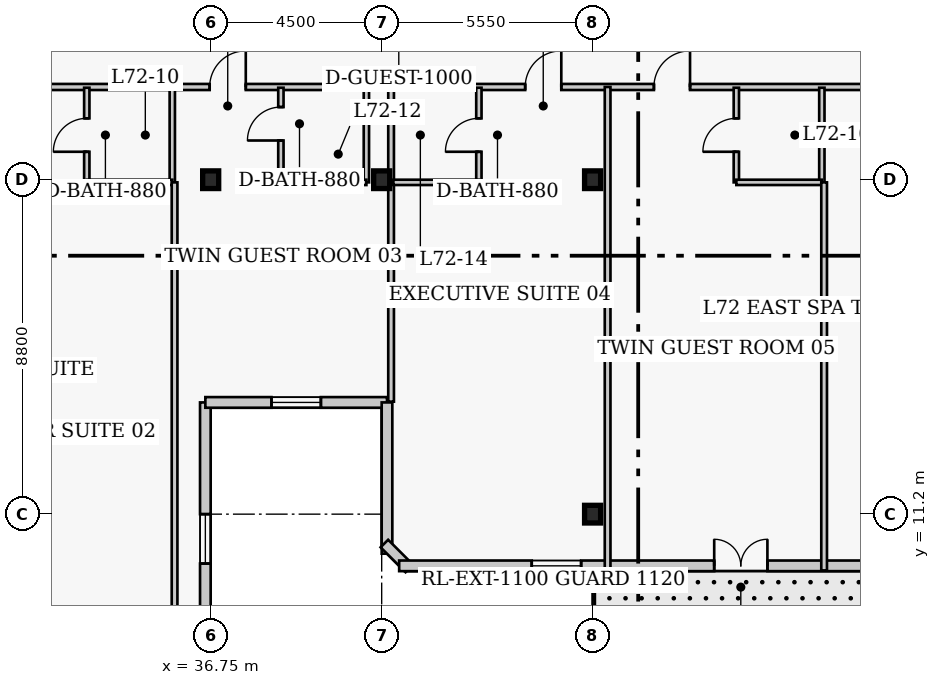
"""IFC4 building model, lengths in metres.
Left out: names, types, materials, properties, quantities, classifications, styles, units other than length and angle.
Written with IfcOpenShell. Run it as: python <this file> out.ifc"""

import sys

from ifc_helpers import new_model, si_unit, direction, frame, frame_2d, origin, origin_2d, place, context, subcontext, project, spatial, rectangle, i_section, extrude, element, fill, save


model = new_model("IFC4")
c1 = context("Model", 3, precision=1e-05, world=origin(), true_north=direction((0.0, 1.0)))
c2 = subcontext(c1, "Body", "Model", "MODEL_VIEW")
j1 = project(units=[si_unit("LENGTHUNIT", "METRE"), si_unit("PLANEANGLEUNIT", "RADIAN")], contexts=[c1])
p1 = place(None, origin())
s1 = spatial("IfcSite", under=j1, at=p1, CompositionType="ELEMENT")
p2 = place(p1, origin())
s2 = spatial("IfcBuilding", under=s1, at=p2, CompositionType="ELEMENT")
p3 = place(p2, frame((0.0, 0.0, 289.4)))
s3 = spatial("IfcBuildingStorey", under=s2, at=p3, CompositionType="ELEMENT", Elevation=289.4)
for number, where, z_axis, x_axis in (
    (1, (36.75, 20.0, 0.0), (0.0, 0.0, 1.0), (1.0, 0.0, 0.0)),
    (2, (41.25, 20.0, 0.0), (0.0, 0.0, 1.0), (1.0, 0.0, 0.0)),
    (3, (46.8, 11.2, 0.0), (0.0, 0.0, 1.0), (1.0, 0.0, 0.0)),
    (4, (46.8, 20.0, 0.0), (0.0, 0.0, 1.0), (1.0, 0.0, 0.0)),
):
    element("IfcColumn", number, at=place(p3, frame(where, z_axis=z_axis, x_axis=x_axis)), inside=s3, PredefinedType="COLUMN", context=c2, shape_type="SweptSolid", body=[
        extrude(i_section(OverallWidth=0.422, OverallDepth=0.465, WebThickness=0.045, FlangeThickness=0.073, FilletRadius=0.017, at=origin_2d()), origin(), (0.0, 0.0, 1.0), 4.0),
    ])
p4 = place(p3, frame((36.61, 6.96, 0.0), z_axis=(0.0, 0.0, 1.0), x_axis=(0.0, 1.0, 0.0)))
e5 = element("IfcWall", 5, at=p4, inside=s3, PredefinedType="SOLIDWALL", context=c2, shape_type="SweptSolid", body=[
    extrude(rectangle(XDim=7.18, YDim=0.28, at=frame_2d((3.59, 0.0))), origin(), (0.0, 0.0, 1.0), 3.76),
])
p5 = place(p4, frame((2.94, 0.0, 0.85)))
e6 = element("IfcOpeningElement", 6, at=p5, cuts=e5, PredefinedType="OPENING", context=c2, shape_type="SweptSolid", body=[
    extrude(rectangle(XDim=1.3, YDim=1.7, at=frame_2d((0.65, 0.85))), frame((0.0, 0.15, 0.0), z_axis=(0.0, -1.0, 0.0), x_axis=(1.0, 0.0, 0.0)), (0.0, 0.0, 1.0), 0.3),
])
p6 = place(p3, frame((36.61, 14.14, 0.0), z_axis=(0.0, 0.0, 1.0), x_axis=(1.0, 0.0, 0.0)))
e7 = element("IfcWall", 7, at=p6, inside=s3, PredefinedType="SOLIDWALL", context=c2, shape_type="SweptSolid", body=[
    extrude(rectangle(XDim=4.78, YDim=0.28, at=frame_2d((2.39, 0.0))), origin(), (0.0, 0.0, 1.0), 3.76),
])
p7 = place(p6, frame((1.74, 0.0, 0.85)))
e8 = element("IfcOpeningElement", 8, at=p7, cuts=e7, PredefinedType="OPENING", context=c2, shape_type="SweptSolid", body=[
    extrude(rectangle(XDim=1.3, YDim=1.7, at=frame_2d((0.65, 0.85))), frame((0.0, 0.15, 0.0), z_axis=(0.0, -1.0, 0.0), x_axis=(1.0, 0.0, 0.0)), (0.0, 0.0, 1.0), 0.3),
])
p8 = place(p3, frame((41.39, 14.14, 0.0), z_axis=(0.0, 0.0, 1.0), x_axis=(0.0, -1.0, 0.0)))
e9 = element("IfcWall", 9, at=p8, inside=s3, PredefinedType="SOLIDWALL", context=c2, shape_type="SweptSolid", body=[
    extrude(rectangle(XDim=3.98, YDim=0.28, at=frame_2d((1.99, 0.0))), origin(), (0.0, 0.0, 1.0), 3.76),
])
p9 = place(p3, frame((41.321, 10.427, 0.0), z_axis=(0.0, 0.0, 1.0), x_axis=(0.707106781187, -0.707106781187, 0.0)))
e10 = element("IfcWall", 10, at=p9, inside=s3, PredefinedType="SOLIDWALL", context=c2, shape_type="SweptSolid", body=[
    extrude(rectangle(XDim=0.928, YDim=0.28, at=frame_2d((0.464, 0.0))), origin(), (0.0, 0.0, 1.0), 3.76),
])
p10 = place(p3, frame((41.71, 9.84, 0.0), z_axis=(0.0, 0.0, 1.0), x_axis=(1.0, 0.0, 0.0)))
e11 = element("IfcWall", 11, at=p10, inside=s3, PredefinedType="SOLIDWALL", context=c2, shape_type="SweptSolid", body=[
    extrude(rectangle(XDim=24.83, YDim=0.28, at=frame_2d((12.415, 0.0))), origin(), (0.0, 0.0, 1.0), 3.76),
])
p11 = place(p10, frame((8.29, 0.0, 0.0)))
e12 = element("IfcOpeningElement", 12, at=p11, cuts=e11, PredefinedType="OPENING", context=c2, shape_type="SweptSolid", body=[
    extrude(rectangle(XDim=1.4, YDim=2.15, at=frame_2d((0.7, 1.075))), frame((0.0, 0.15, 0.0), z_axis=(0.0, -1.0, 0.0), x_axis=(1.0, 0.0, 0.0)), (0.0, 0.0, 1.0), 0.3),
])
p12 = place(p10, frame((3.488, 0.0, 0.85)))
e13 = element("IfcOpeningElement", 13, at=p12, cuts=e11, PredefinedType="OPENING", context=c2, shape_type="SweptSolid", body=[
    extrude(rectangle(XDim=1.3, YDim=1.7, at=frame_2d((0.65, 0.85))), frame((0.0, 0.15, 0.0), z_axis=(0.0, -1.0, 0.0), x_axis=(1.0, 0.0, 0.0)), (0.0, 0.0, 1.0), 0.3),
])
p13 = place(p10, frame((18.892, 0.0, 0.85)))
e14 = element("IfcOpeningElement", 14, at=p13, cuts=e11, PredefinedType="OPENING", context=c2, shape_type="SweptSolid", body=[
    extrude(rectangle(XDim=1.3, YDim=1.7, at=frame_2d((0.65, 0.85))), frame((0.0, 0.15, 0.0), z_axis=(0.0, -1.0, 0.0), x_axis=(1.0, 0.0, 0.0)), (0.0, 0.0, 1.0), 0.3),
])
p14 = place(p10, frame((13.391, 0.0, 0.85)))
e15 = element("IfcOpeningElement", 15, at=p14, cuts=e11, PredefinedType="OPENING", context=c2, shape_type="SweptSolid", body=[
    extrude(rectangle(XDim=1.3, YDim=1.7, at=frame_2d((0.65, 0.85))), frame((0.0, 0.15, 0.0), z_axis=(0.0, -1.0, 0.0), x_axis=(1.0, 0.0, 0.0)), (0.0, 0.0, 1.0), 0.3),
])
p15 = place(p3, frame((19.9, 22.44, 0.0), z_axis=(0.0, 0.0, 1.0), x_axis=(1.0, 0.0, 0.0)))
e16 = element("IfcWall", 16, at=p15, inside=s3, PredefinedType="PARTITIONING", context=c2, shape_type="SweptSolid", body=[
    extrude(rectangle(XDim=15.9, YDim=0.16, at=frame_2d((7.95, 0.0))), origin(), (0.0, 0.0, 1.0), 3.76),
])
p16 = place(p15, frame((3.265, 0.0, 0.0)))
e17 = element("IfcOpeningElement", 17, at=p16, cuts=e16, PredefinedType="OPENING", context=c2, shape_type="SweptSolid", body=[
    extrude(rectangle(XDim=0.95, YDim=2.1, at=frame_2d((0.475, 1.05))), frame((0.0, 0.09, 0.0), z_axis=(0.0, -1.0, 0.0), x_axis=(1.0, 0.0, 0.0)), (0.0, 0.0, 1.0), 0.18),
])
p17 = place(p15, frame((7.135, 0.0, 0.0)))
e18 = element("IfcOpeningElement", 18, at=p17, cuts=e16, PredefinedType="OPENING", context=c2, shape_type="SweptSolid", body=[
    extrude(rectangle(XDim=1.0, YDim=2.15, at=frame_2d((0.5, 1.075))), frame((0.0, 0.09, 0.0), z_axis=(0.0, -1.0, 0.0), x_axis=(1.0, 0.0, 0.0)), (0.0, 0.0, 1.0), 0.18),
])
p18 = place(p15, frame((11.4, 0.0, 0.0)))
e19 = element("IfcOpeningElement", 19, at=p18, cuts=e16, PredefinedType="OPENING", context=c2, shape_type="SweptSolid", body=[
    extrude(rectangle(XDim=0.95, YDim=2.1, at=frame_2d((0.475, 1.05))), frame((0.0, 0.09, 0.0), z_axis=(0.0, -1.0, 0.0), x_axis=(1.0, 0.0, 0.0)), (0.0, 0.0, 1.0), 0.18),
])
p19 = place(p3, frame((35.8, 22.44, 0.0), z_axis=(0.0, 0.0, 1.0), x_axis=(1.0, 0.0, 0.0)))
e20 = element("IfcWall", 20, at=p19, inside=s3, PredefinedType="PARTITIONING", context=c2, shape_type="SweptSolid", body=[
    extrude(rectangle(XDim=25.01, YDim=0.16, at=frame_2d((12.505, 0.0))), origin(), (0.0, 0.0, 1.0), 3.76),
])
p20 = place(p19, frame((0.924, 0.0, 0.0)))
e21 = element("IfcOpeningElement", 21, at=p20, cuts=e20, PredefinedType="OPENING", context=c2, shape_type="SweptSolid", body=[
    extrude(rectangle(XDim=0.95, YDim=2.1, at=frame_2d((0.475, 1.05))), frame((0.0, 0.09, 0.0), z_axis=(0.0, -1.0, 0.0), x_axis=(1.0, 0.0, 0.0)), (0.0, 0.0, 1.0), 0.18),
])
p21 = place(p19, frame((9.226, 0.0, 0.0)))
e22 = element("IfcOpeningElement", 22, at=p21, cuts=e20, PredefinedType="OPENING", context=c2, shape_type="SweptSolid", body=[
    extrude(rectangle(XDim=0.95, YDim=2.1, at=frame_2d((0.475, 1.05))), frame((0.0, 0.09, 0.0), z_axis=(0.0, -1.0, 0.0), x_axis=(1.0, 0.0, 0.0)), (0.0, 0.0, 1.0), 0.18),
])
p22 = place(p19, frame((12.614, 0.0, 0.0)))
e23 = element("IfcOpeningElement", 23, at=p22, cuts=e20, PredefinedType="OPENING", context=c2, shape_type="SweptSolid", body=[
    extrude(rectangle(XDim=0.95, YDim=2.1, at=frame_2d((0.475, 1.05))), frame((0.0, 0.09, 0.0), z_axis=(0.0, -1.0, 0.0), x_axis=(1.0, 0.0, 0.0)), (0.0, 0.0, 1.0), 0.18),
])
p23 = place(p19, frame((19.441, 0.0, 0.0)))
e24 = element("IfcOpeningElement", 24, at=p23, cuts=e20, PredefinedType="OPENING", context=c2, shape_type="SweptSolid", body=[
    extrude(rectangle(XDim=1.0, YDim=2.15, at=frame_2d((0.5, 1.075))), frame((0.0, 0.09, 0.0), z_axis=(0.0, -1.0, 0.0), x_axis=(1.0, 0.0, 0.0)), (0.0, 0.0, 1.0), 0.18),
])
p24 = place(p19, frame((23.465, 0.0, 0.0)))
e25 = element("IfcOpeningElement", 25, at=p24, cuts=e20, PredefinedType="OPENING", context=c2, shape_type="SweptSolid", body=[
    extrude(rectangle(XDim=0.95, YDim=2.1, at=frame_2d((0.475, 1.05))), frame((0.0, 0.09, 0.0), z_axis=(0.0, -1.0, 0.0), x_axis=(1.0, 0.0, 0.0)), (0.0, 0.0, 1.0), 0.18),
])
p25 = place(p3, frame((33.49, 19.93, 0.0), z_axis=(0.0, 0.0, 1.0), x_axis=(0.0, 1.0, 0.0)))
e26 = element("IfcWall", 26, at=p25, inside=s3, PredefinedType="PLUMBINGWALL", context=c2, shape_type="SweptSolid", body=[
    extrude(rectangle(XDim=2.49, YDim=0.14, at=frame_2d((1.245, 0.0))), origin(), (0.0, 0.0, 1.0), 3.76),
])
p26 = place(p25, frame((0.805, 0.0, 0.0)))
e27 = element("IfcOpeningElement", 27, at=p26, cuts=e26, PredefinedType="OPENING", context=c2, shape_type="SweptSolid", body=[
    extrude(rectangle(XDim=0.88, YDim=2.05, at=frame_2d((0.44, 1.025))), frame((0.0, 0.08, 0.0), z_axis=(0.0, -1.0, 0.0), x_axis=(1.0, 0.0, 0.0)), (0.0, 0.0, 1.0), 0.16),
])
p27 = place(p3, frame((35.74, 19.93, 0.0), z_axis=(0.0, 0.0, 1.0), x_axis=(0.0, 1.0, 0.0)))
e28 = element("IfcWall", 28, at=p27, inside=s3, PredefinedType="PLUMBINGWALL", context=c2, shape_type="SweptSolid", body=[
    extrude(rectangle(XDim=2.49, YDim=0.14, at=frame_2d((1.245, 0.0))), origin(), (0.0, 0.0, 1.0), 3.76),
])
p28 = place(p3, frame((33.49, 19.93, 0.0), z_axis=(0.0, 0.0, 1.0), x_axis=(1.0, 0.0, 0.0)))
e29 = element("IfcWall", 29, at=p28, inside=s3, PredefinedType="PLUMBINGWALL", context=c2, shape_type="SweptSolid", body=[
    extrude(rectangle(XDim=2.25, YDim=0.14, at=frame_2d((1.125, 0.0))), origin(), (0.0, 0.0, 1.0), 3.064),
])
p29 = place(p3, frame((35.8, 6.52, 0.0), z_axis=(0.0, 0.0, 1.0), x_axis=(0.0, 1.0, 0.0)))
e30 = element("IfcWall", 30, at=p29, inside=s3, PredefinedType="PARTITIONING", context=c2, shape_type="SweptSolid", body=[
    extrude(rectangle(XDim=13.41, YDim=0.15, at=frame_2d((6.705, 0.0))), origin(), (0.0, 0.0, 1.0), 3.76),
])
p30 = place(p3, frame((38.597, 19.93, 0.0), z_axis=(0.0, 0.0, 1.0), x_axis=(0.0, 1.0, 0.0)))
e31 = element("IfcWall", 31, at=p30, inside=s3, PredefinedType="PLUMBINGWALL", context=c2, shape_type="SweptSolid", body=[
    extrude(rectangle(XDim=2.49, YDim=0.14, at=frame_2d((1.245, 0.0))), origin(), (0.0, 0.0, 1.0), 3.76),
])
p31 = place(p30, frame((1.102, 0.0, 0.0)))
e32 = element("IfcOpeningElement", 32, at=p31, cuts=e31, PredefinedType="OPENING", context=c2, shape_type="SweptSolid", body=[
    extrude(rectangle(XDim=0.88, YDim=2.05, at=frame_2d((0.44, 1.025))), frame((0.0, 0.08, 0.0), z_axis=(0.0, -1.0, 0.0), x_axis=(1.0, 0.0, 0.0)), (0.0, 0.0, 1.0), 0.16),
])
p32 = place(p3, frame((40.847, 19.93, 0.0), z_axis=(0.0, 0.0, 1.0), x_axis=(0.0, 1.0, 0.0)))
e33 = element("IfcWall", 33, at=p32, inside=s3, PredefinedType="PLUMBINGWALL", context=c2, shape_type="SweptSolid", body=[
    extrude(rectangle(XDim=2.49, YDim=0.14, at=frame_2d((1.245, 0.0))), origin(), (0.0, 0.0, 1.0), 3.76),
])
p33 = place(p3, frame((38.597, 19.93, 0.0), z_axis=(0.0, 0.0, 1.0), x_axis=(1.0, 0.0, 0.0)))
e34 = element("IfcWall", 34, at=p33, inside=s3, PredefinedType="PLUMBINGWALL", context=c2, shape_type="SweptSolid", body=[
    extrude(rectangle(XDim=2.25, YDim=0.14, at=frame_2d((1.125, 0.0))), origin(), (0.0, 0.0, 1.0), 3.064),
])
p34 = place(p3, frame((41.498, 14.16, 0.0), z_axis=(0.0, 0.0, 1.0), x_axis=(0.0, 1.0, 0.0)))
e35 = element("IfcWall", 35, at=p34, inside=s3, PredefinedType="PARTITIONING", context=c2, shape_type="SweptSolid", body=[
    extrude(rectangle(XDim=8.28, YDim=0.15, at=frame_2d((4.14, 0.0))), origin(), (0.0, 0.0, 1.0), 3.76),
])
p35 = place(p3, frame((43.808, 19.93, 0.0), z_axis=(0.0, 0.0, 1.0), x_axis=(0.0, 1.0, 0.0)))
e36 = element("IfcWall", 36, at=p35, inside=s3, PredefinedType="PLUMBINGWALL", context=c2, shape_type="SweptSolid", body=[
    extrude(rectangle(XDim=2.49, YDim=0.14, at=frame_2d((1.245, 0.0))), origin(), (0.0, 0.0, 1.0), 3.76),
])
p36 = place(p35, frame((0.805, 0.0, 0.0)))
e37 = element("IfcOpeningElement", 37, at=p36, cuts=e36, PredefinedType="OPENING", context=c2, shape_type="SweptSolid", body=[
    extrude(rectangle(XDim=0.88, YDim=2.05, at=frame_2d((0.44, 1.025))), frame((0.0, 0.08, 0.0), z_axis=(0.0, -1.0, 0.0), x_axis=(1.0, 0.0, 0.0)), (0.0, 0.0, 1.0), 0.16),
])
p37 = place(p3, frame((41.558, 19.93, 0.0), z_axis=(0.0, 0.0, 1.0), x_axis=(1.0, 0.0, 0.0)))
e38 = element("IfcWall", 38, at=p37, inside=s3, PredefinedType="PLUMBINGWALL", context=c2, shape_type="SweptSolid", body=[
    extrude(rectangle(XDim=2.25, YDim=0.14, at=frame_2d((1.125, 0.0))), origin(), (0.0, 0.0, 1.0), 3.064),
])
p38 = place(p3, frame((47.195, 9.72, 0.0), z_axis=(0.0, 0.0, 1.0), x_axis=(0.0, 1.0, 0.0)))
e39 = element("IfcWall", 39, at=p38, inside=s3, PredefinedType="PARTITIONING", context=c2, shape_type="SweptSolid", body=[
    extrude(rectangle(XDim=12.72, YDim=0.15, at=frame_2d((6.36, 0.0))), origin(), (0.0, 0.0, 1.0), 3.76),
])
p39 = place(p3, frame((50.583, 19.93, 0.0), z_axis=(0.0, 0.0, 1.0), x_axis=(0.0, 1.0, 0.0)))
e40 = element("IfcWall", 40, at=p39, inside=s3, PredefinedType="PLUMBINGWALL", context=c2, shape_type="SweptSolid", body=[
    extrude(rectangle(XDim=2.49, YDim=0.14, at=frame_2d((1.245, 0.0))), origin(), (0.0, 0.0, 1.0), 3.76),
])
p40 = place(p39, frame((0.805, 0.0, 0.0)))
e41 = element("IfcOpeningElement", 41, at=p40, cuts=e40, PredefinedType="OPENING", context=c2, shape_type="SweptSolid", body=[
    extrude(rectangle(XDim=0.88, YDim=2.05, at=frame_2d((0.44, 1.025))), frame((0.0, 0.08, 0.0), z_axis=(0.0, -1.0, 0.0), x_axis=(1.0, 0.0, 0.0)), (0.0, 0.0, 1.0), 0.16),
])
p41 = place(p3, frame((52.833, 19.93, 0.0), z_axis=(0.0, 0.0, 1.0), x_axis=(0.0, 1.0, 0.0)))
e42 = element("IfcWall", 42, at=p41, inside=s3, PredefinedType="PLUMBINGWALL", context=c2, shape_type="SweptSolid", body=[
    extrude(rectangle(XDim=2.49, YDim=0.14, at=frame_2d((1.245, 0.0))), origin(), (0.0, 0.0, 1.0), 3.76),
])
p42 = place(p3, frame((50.583, 19.93, 0.0), z_axis=(0.0, 0.0, 1.0), x_axis=(1.0, 0.0, 0.0)))
e43 = element("IfcWall", 43, at=p42, inside=s3, PredefinedType="PLUMBINGWALL", context=c2, shape_type="SweptSolid", body=[
    extrude(rectangle(XDim=2.25, YDim=0.14, at=frame_2d((1.125, 0.0))), origin(), (0.0, 0.0, 1.0), 3.064),
])
p43 = place(p3, frame((52.893, 9.72, 0.0), z_axis=(0.0, 0.0, 1.0), x_axis=(0.0, 1.0, 0.0)))
e44 = element("IfcWall", 44, at=p43, inside=s3, PredefinedType="PARTITIONING", context=c2, shape_type="SweptSolid", body=[
    extrude(rectangle(XDim=10.21, YDim=0.15, at=frame_2d((5.105, 0.0))), origin(), (0.0, 0.0, 1.0), 3.76),
])
p44 = place(p5, origin())
e45 = element("IfcWindow", 45, at=p44, inside=s3, PartitioningType="SINGLE_PANEL", PredefinedType="WINDOW", context=c2, shape_type="SweptSolid", body=[
    extrude(rectangle(XDim=1.3, YDim=1.7, at=frame_2d((0.65, 0.85))), frame((0.0, 0.03, 0.0), z_axis=(0.0, -1.0, 0.0), x_axis=(1.0, 0.0, 0.0)), (0.0, 0.0, 1.0), 0.06),
])
fill(e6, e45)
p45 = place(p7, origin())
e46 = element("IfcWindow", 46, at=p45, inside=s3, PartitioningType="SINGLE_PANEL", PredefinedType="WINDOW", context=c2, shape_type="SweptSolid", body=[
    extrude(rectangle(XDim=1.3, YDim=1.7, at=frame_2d((0.65, 0.85))), frame((0.0, 0.03, 0.0), z_axis=(0.0, -1.0, 0.0), x_axis=(1.0, 0.0, 0.0)), (0.0, 0.0, 1.0), 0.06),
])
fill(e8, e46)
p46 = place(p11, origin())
e47 = element("IfcDoor", 47, at=p46, inside=s3, OperationType="DOUBLE_DOOR_SINGLE_SWING", PredefinedType="DOOR", context=c2, shape_type="SweptSolid", body=[
    extrude(rectangle(XDim=1.4, YDim=2.15, at=frame_2d((0.7, 1.075))), frame((0.0, 0.025, 0.0), z_axis=(0.0, -1.0, 0.0), x_axis=(1.0, 0.0, 0.0)), (0.0, 0.0, 1.0), 0.05),
])
fill(e12, e47)
p47 = place(p12, origin())
e48 = element("IfcWindow", 48, at=p47, inside=s3, PartitioningType="SINGLE_PANEL", PredefinedType="WINDOW", context=c2, shape_type="SweptSolid", body=[
    extrude(rectangle(XDim=1.3, YDim=1.7, at=frame_2d((0.65, 0.85))), frame((0.0, 0.03, 0.0), z_axis=(0.0, -1.0, 0.0), x_axis=(1.0, 0.0, 0.0)), (0.0, 0.0, 1.0), 0.06),
])
fill(e13, e48)
p48 = place(p26, origin())
e49 = element("IfcDoor", 49, at=p48, inside=s3, OperationType="SINGLE_SWING_LEFT", PredefinedType="DOOR", context=c2, shape_type="SweptSolid", body=[
    extrude(rectangle(XDim=0.88, YDim=2.05, at=frame_2d((0.44, 1.025))), frame((0.0, 0.025, 0.0), z_axis=(0.0, -1.0, 0.0), x_axis=(1.0, 0.0, 0.0)), (0.0, 0.0, 1.0), 0.05),
])
fill(e27, e49)
p49 = place(p31, origin())
e50 = element("IfcDoor", 50, at=p49, inside=s3, OperationType="SINGLE_SWING_LEFT", PredefinedType="DOOR", context=c2, shape_type="SweptSolid", body=[
    extrude(rectangle(XDim=0.88, YDim=2.05, at=frame_2d((0.44, 1.025))), frame((0.0, 0.025, 0.0), z_axis=(0.0, -1.0, 0.0), x_axis=(1.0, 0.0, 0.0)), (0.0, 0.0, 1.0), 0.05),
])
fill(e32, e50)
p50 = place(p20, origin())
e51 = element("IfcDoor", 51, at=p50, inside=s3, OperationType="SINGLE_SWING_RIGHT", PredefinedType="DOOR", context=c2, shape_type="SweptSolid", body=[
    extrude(rectangle(XDim=0.95, YDim=2.1, at=frame_2d((0.475, 1.05))), frame((0.0, 0.025, 0.0), z_axis=(0.0, -1.0, 0.0), x_axis=(1.0, 0.0, 0.0)), (0.0, 0.0, 1.0), 0.05),
])
fill(e21, e51)
p51 = place(p36, origin())
e52 = element("IfcDoor", 52, at=p51, inside=s3, OperationType="SINGLE_SWING_LEFT", PredefinedType="DOOR", context=c2, shape_type="SweptSolid", body=[
    extrude(rectangle(XDim=0.88, YDim=2.05, at=frame_2d((0.44, 1.025))), frame((0.0, 0.025, 0.0), z_axis=(0.0, -1.0, 0.0), x_axis=(1.0, 0.0, 0.0)), (0.0, 0.0, 1.0), 0.05),
])
fill(e37, e52)
p52 = place(p21, origin())
e53 = element("IfcDoor", 53, at=p52, inside=s3, OperationType="SINGLE_SWING_RIGHT", PredefinedType="DOOR", context=c2, shape_type="SweptSolid", body=[
    extrude(rectangle(XDim=0.95, YDim=2.1, at=frame_2d((0.475, 1.05))), frame((0.0, 0.025, 0.0), z_axis=(0.0, -1.0, 0.0), x_axis=(1.0, 0.0, 0.0)), (0.0, 0.0, 1.0), 0.05),
])
fill(e22, e53)
p53 = place(p40, origin())
e54 = element("IfcDoor", 54, at=p53, inside=s3, OperationType="SINGLE_SWING_LEFT", PredefinedType="DOOR", context=c2, shape_type="SweptSolid", body=[
    extrude(rectangle(XDim=0.88, YDim=2.05, at=frame_2d((0.44, 1.025))), frame((0.0, 0.025, 0.0), z_axis=(0.0, -1.0, 0.0), x_axis=(1.0, 0.0, 0.0)), (0.0, 0.0, 1.0), 0.05),
])
fill(e41, e54)
p54 = place(p22, origin())
e55 = element("IfcDoor", 55, at=p54, inside=s3, OperationType="SINGLE_SWING_RIGHT", PredefinedType="DOOR", context=c2, shape_type="SweptSolid", body=[
    extrude(rectangle(XDim=0.95, YDim=2.1, at=frame_2d((0.475, 1.05))), frame((0.0, 0.025, 0.0), z_axis=(0.0, -1.0, 0.0), x_axis=(1.0, 0.0, 0.0)), (0.0, 0.0, 1.0), 0.05),
])
fill(e23, e55)
save(model, sys.argv[1])
